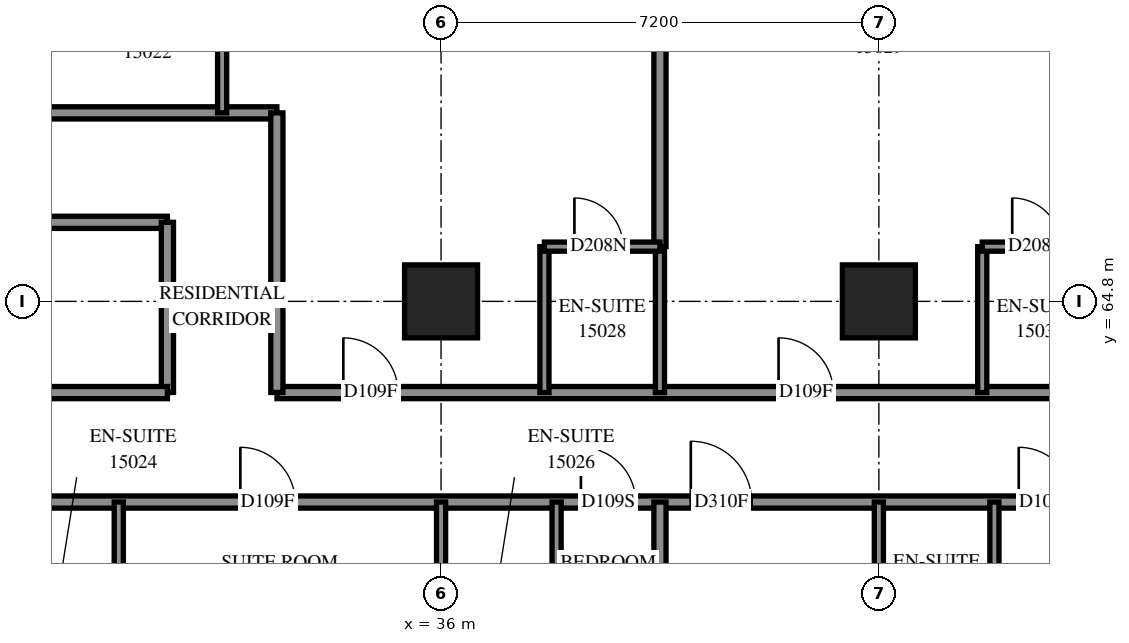
"""IFC4 building model, lengths in metres.
Left out: names, types, materials, properties, quantities, classifications, styles, units other than length and angle.
Written with IfcOpenShell. Run it as: python <this file> out.ifc"""

import sys

from ifc_helpers import new_model, si_unit, direction, frame, frame_2d, origin, origin_2d, place, context, subcontext, project, spatial, rectangle, extrude, element, fill, save


model = new_model("IFC4")
c1 = context("Model", 3, precision=1e-05, world=origin(), true_north=direction((0.0, 1.0)))
c2 = subcontext(c1, "Body", "Model", "MODEL_VIEW")
j1 = project(units=[si_unit("LENGTHUNIT", "METRE"), si_unit("PLANEANGLEUNIT", "RADIAN")], contexts=[c1])
p1 = place(None, origin())
s1 = spatial("IfcSite", under=j1, at=p1, CompositionType="ELEMENT")
p2 = place(p1, origin())
s2 = spatial("IfcBuilding", under=s1, at=p2, CompositionType="ELEMENT")
p3 = place(p2, frame((0.0, 0.0, 57.6)))
s3 = spatial("IfcBuildingStorey", under=s2, at=p3, CompositionType="ELEMENT", Elevation=57.6)
for number, where, z_axis, x_axis in (
    (1, (36.0, 64.8, 0.0), (0.0, 0.0, 1.0), (1.0, 0.0, 0.0)),
    (2, (43.2, 64.8, 0.0), (0.0, 0.0, 1.0), (1.0, 0.0, 0.0)),
):
    element("IfcColumn", number, at=place(p3, frame(where, z_axis=z_axis, x_axis=x_axis)), inside=s3, PredefinedType="COLUMN", context=c2, shape_type="SweptSolid", body=[
        extrude(rectangle(XDim=1.2, YDim=1.2, at=origin_2d()), origin(), (0.0, 0.0, 1.0), 3.1),
    ])
p4 = place(p3, frame((28.8, 61.5, 0.0), z_axis=(0.0, 0.0, 1.0), x_axis=(1.0, 0.0, 0.0)))
e3 = element("IfcWall", 3, at=p4, inside=s3, PredefinedType="PARTITIONING", context=c2, shape_type="SweptSolid", body=[
    extrude(rectangle(XDim=24.3, YDim=0.2, at=frame_2d((12.15, 0.0))), origin(), (0.0, 0.0, 1.0), 3.1),
])
p5 = place(p4, frame((3.899, 0.0, 0.0)))
e4 = element("IfcOpeningElement", 4, at=p5, cuts=e3, PredefinedType="OPENING", context=c2, shape_type="SweptSolid", body=[
    extrude(rectangle(XDim=0.9, YDim=2.1, at=frame_2d((0.45, 1.05))), frame((0.0, 0.11, 0.0), z_axis=(0.0, -1.0, 0.0), x_axis=(1.0, 0.0, 0.0)), (0.0, 0.0, 1.0), 0.22),
])
p6 = place(p4, frame((9.5, 0.0, 0.0)))
e5 = element("IfcOpeningElement", 5, at=p6, cuts=e3, PredefinedType="OPENING", context=c2, shape_type="SweptSolid", body=[
    extrude(rectangle(XDim=0.9, YDim=2.1, at=frame_2d((0.45, 1.05))), frame((0.0, 0.11, 0.0), z_axis=(0.0, -1.0, 0.0), x_axis=(1.0, 0.0, 0.0)), (0.0, 0.0, 1.0), 0.22),
])
p7 = place(p4, frame((11.307, 0.0, 0.0)))
e6 = element("IfcOpeningElement", 6, at=p7, cuts=e3, PredefinedType="OPENING", context=c2, shape_type="SweptSolid", body=[
    extrude(rectangle(XDim=1.0, YDim=2.1, at=frame_2d((0.5, 1.05))), frame((0.0, 0.11, 0.0), z_axis=(0.0, -1.0, 0.0), x_axis=(1.0, 0.0, 0.0)), (0.0, 0.0, 1.0), 0.22),
])
p8 = place(p4, frame((16.7, 0.0, 0.0)))
e7 = element("IfcOpeningElement", 7, at=p8, cuts=e3, PredefinedType="OPENING", context=c2, shape_type="SweptSolid", body=[
    extrude(rectangle(XDim=0.9, YDim=2.1, at=frame_2d((0.45, 1.05))), frame((0.0, 0.11, 0.0), z_axis=(0.0, -1.0, 0.0), x_axis=(1.0, 0.0, 0.0)), (0.0, 0.0, 1.0), 0.22),
])
p9 = place(p4, frame((18.508, 0.0, 0.0)))
e8 = element("IfcOpeningElement", 8, at=p9, cuts=e3, PredefinedType="OPENING", context=c2, shape_type="SweptSolid", body=[
    extrude(rectangle(XDim=1.0, YDim=2.1, at=frame_2d((0.5, 1.05))), frame((0.0, 0.11, 0.0), z_axis=(0.0, -1.0, 0.0), x_axis=(1.0, 0.0, 0.0)), (0.0, 0.0, 1.0), 0.22),
])
p10 = place(p4, frame((23.033, 0.0, 0.0)))
e9 = element("IfcOpeningElement", 9, at=p10, cuts=e3, PredefinedType="OPENING", context=c2, shape_type="SweptSolid", body=[
    extrude(rectangle(XDim=1.0, YDim=2.1, at=frame_2d((0.5, 1.05))), frame((0.0, 0.11, 0.0), z_axis=(0.0, -1.0, 0.0), x_axis=(1.0, 0.0, 0.0)), (0.0, 0.0, 1.0), 0.22),
])
p11 = place(p3, frame((33.302, 63.3, 0.0), z_axis=(0.0, 0.0, 1.0), x_axis=(1.0, 0.0, 0.0)))
e10 = element("IfcWall", 10, at=p11, inside=s3, PredefinedType="PARTITIONING", context=c2, shape_type="SweptSolid", body=[
    extrude(rectangle(XDim=21.798, YDim=0.2, at=frame_2d((10.899, 0.0))), origin(), (0.0, 0.0, 1.0), 3.1),
])
p12 = place(p11, frame((1.091, 0.0, 0.0)))
e11 = element("IfcOpeningElement", 11, at=p12, cuts=e10, PredefinedType="OPENING", context=c2, shape_type="SweptSolid", body=[
    extrude(rectangle(XDim=0.9, YDim=2.1, at=frame_2d((0.45, 1.05))), frame((0.0, 0.11, 0.0), z_axis=(0.0, -1.0, 0.0), x_axis=(1.0, 0.0, 0.0)), (0.0, 0.0, 1.0), 0.22),
])
p13 = place(p11, frame((8.248, 0.0, 0.0)))
e12 = element("IfcOpeningElement", 12, at=p13, cuts=e10, PredefinedType="OPENING", context=c2, shape_type="SweptSolid", body=[
    extrude(rectangle(XDim=0.9, YDim=2.1, at=frame_2d((0.45, 1.05))), frame((0.0, 0.11, 0.0), z_axis=(0.0, -1.0, 0.0), x_axis=(1.0, 0.0, 0.0)), (0.0, 0.0, 1.0), 0.22),
])
p14 = place(p11, frame((15.448, 0.0, 0.0)))
e13 = element("IfcOpeningElement", 13, at=p14, cuts=e10, PredefinedType="OPENING", context=c2, shape_type="SweptSolid", body=[
    extrude(rectangle(XDim=0.9, YDim=2.1, at=frame_2d((0.45, 1.05))), frame((0.0, 0.11, 0.0), z_axis=(0.0, -1.0, 0.0), x_axis=(1.0, 0.0, 0.0)), (0.0, 0.0, 1.0), 0.22),
])
p15 = place(p3, frame((21.602, 67.9, 0.0), z_axis=(0.0, 0.0, 1.0), x_axis=(1.0, 0.0, 0.0)))
e14 = element("IfcWall", 14, at=p15, inside=s3, PredefinedType="PARTITIONING", context=c2, shape_type="SweptSolid", body=[
    extrude(rectangle(XDim=11.698, YDim=0.2, at=frame_2d((5.849, 0.0))), origin(), (0.0, 0.0, 1.0), 3.1),
])
p16 = place(p15, frame((5.955, 0.0, 0.0)))
e15 = element("IfcOpeningElement", 15, at=p16, cuts=e14, PredefinedType="OPENING", context=c2, shape_type="SweptSolid", body=[
    extrude(rectangle(XDim=0.9, YDim=2.1, at=frame_2d((0.45, 1.05))), frame((0.0, 0.11, 0.0), z_axis=(0.0, -1.0, 0.0), x_axis=(1.0, 0.0, 0.0)), (0.0, 0.0, 1.0), 0.22),
])
p17 = place(p3, frame((21.6, 66.1, 0.0), z_axis=(0.0, 0.0, 1.0), x_axis=(1.0, 0.0, 0.0)))
e16 = element("IfcWall", 16, at=p17, inside=s3, PredefinedType="PARTITIONING", context=c2, shape_type="SweptSolid", body=[
    extrude(rectangle(XDim=9.9, YDim=0.2, at=frame_2d((4.95, 0.0))), origin(), (0.0, 0.0, 1.0), 3.1),
])
p18 = place(p17, frame((5.314, 0.0, 0.0)))
e17 = element("IfcOpeningElement", 17, at=p18, cuts=e16, PredefinedType="OPENING", context=c2, shape_type="SweptSolid", body=[
    extrude(rectangle(XDim=1.0, YDim=2.1, at=frame_2d((0.5, 1.05))), frame((0.0, 0.11, 0.0), z_axis=(0.0, -1.0, 0.0), x_axis=(1.0, 0.0, 0.0)), (0.0, 0.0, 1.0), 0.22),
])
p19 = place(p3, frame((39.6, 65.7, 0.0), z_axis=(0.0, 0.0, 1.0), x_axis=(0.0, 1.0, 0.0)))
e18 = element("IfcWall", 18, at=p19, inside=s3, PredefinedType="PARTITIONING", context=c2, shape_type="SweptSolid", body=[
    extrude(rectangle(XDim=7.143, YDim=0.2, at=frame_2d((3.571, 0.0))), origin(), (0.0, 0.0, 1.0), 3.1),
])
p20 = place(p3, frame((39.6, 55.778, 0.0), z_axis=(0.0, 0.0, 1.0), x_axis=(0.0, 1.0, 0.0)))
e19 = element("IfcWall", 19, at=p20, inside=s3, PredefinedType="PARTITIONING", context=c2, shape_type="SweptSolid", body=[
    extrude(rectangle(XDim=5.722, YDim=0.2, at=frame_2d((2.861, 0.0))), origin(), (0.0, 0.0, 1.0), 3.1),
])
p21 = place(p3, frame((33.3, 63.302, 0.0), z_axis=(0.0, 0.0, 1.0), x_axis=(0.0, 1.0, 0.0)))
e20 = element("IfcWall", 20, at=p21, inside=s3, PredefinedType="PARTITIONING", context=c2, shape_type="SweptSolid", body=[
    extrude(rectangle(XDim=4.598, YDim=0.2, at=frame_2d((2.299, 0.0))), origin(), (0.0, 0.0, 1.0), 3.1),
])
p22 = place(p3, frame((31.5, 63.302, 0.0), z_axis=(0.0, 0.0, 1.0), x_axis=(0.0, 1.0, 0.0)))
e21 = element("IfcWall", 21, at=p22, inside=s3, PredefinedType="PARTITIONING", context=c2, shape_type="SweptSolid", body=[
    extrude(rectangle(XDim=2.798, YDim=0.2, at=frame_2d((1.399, 0.0))), origin(), (0.0, 0.0, 1.0), 3.1),
])
p23 = place(p3, frame((28.802, 63.3, 0.0), z_axis=(0.0, 0.0, 1.0), x_axis=(1.0, 0.0, 0.0)))
e22 = element("IfcWall", 22, at=p23, inside=s3, PredefinedType="PARTITIONING", context=c2, shape_type="SweptSolid", body=[
    extrude(rectangle(XDim=2.698, YDim=0.2, at=frame_2d((1.349, 0.0))), origin(), (0.0, 0.0, 1.0), 3.1),
])
for number, where, z_axis, x_axis in (
    (23, (37.7, 63.3, 0.0), (0.0, 0.0, 1.0), (0.0, 1.0, 0.0)),
    (24, (39.6, 63.3, 0.0), (0.0, 0.0, 1.0), (0.0, 1.0, 0.0)),
    (25, (44.9, 63.3, 0.0), (0.0, 0.0, 1.0), (0.0, 1.0, 0.0)),
    (26, (30.7, 59.1, 0.0), (0.0, 0.0, 1.0), (0.0, 1.0, 0.0)),
    (27, (37.9, 59.1, 0.0), (0.0, 0.0, 1.0), (0.0, 1.0, 0.0)),
    (28, (36.0, 59.1, 0.0), (0.0, 0.0, 1.0), (0.0, 1.0, 0.0)),
    (29, (45.1, 59.1, 0.0), (0.0, 0.0, 1.0), (0.0, 1.0, 0.0)),
    (30, (43.2, 59.1, 0.0), (0.0, 0.0, 1.0), (0.0, 1.0, 0.0)),
    (31, (32.4, 67.9, 0.0), (0.0, 0.0, 1.0), (0.0, 1.0, 0.0)),
):
    element("IfcWall", number, at=place(p3, frame(where, z_axis=z_axis, x_axis=x_axis)), inside=s3, PredefinedType="PARTITIONING", context=c2, shape_type="SweptSolid", body=[
        extrude(rectangle(XDim=2.4, YDim=0.15, at=frame_2d((1.2, 0.0))), origin(), (0.0, 0.0, 1.0), 3.1),
    ])
p24 = place(p3, frame((37.7, 65.7, 0.0), z_axis=(0.0, 0.0, 1.0), x_axis=(1.0, 0.0, 0.0)))
e32 = element("IfcWall", 32, at=p24, inside=s3, PredefinedType="PARTITIONING", context=c2, shape_type="SweptSolid", body=[
    extrude(rectangle(XDim=1.9, YDim=0.15, at=frame_2d((0.95, 0.0))), origin(), (0.0, 0.0, 1.0), 3.1),
])
p25 = place(p24, frame((0.493, 0.0, 0.0)))
e33 = element("IfcOpeningElement", 33, at=p25, cuts=e32, PredefinedType="OPENING", context=c2, shape_type="SweptSolid", body=[
    extrude(rectangle(XDim=0.8, YDim=2.1, at=frame_2d((0.4, 1.05))), frame((0.0, 0.085, 0.0), z_axis=(0.0, -1.0, 0.0), x_axis=(1.0, 0.0, 0.0)), (0.0, 0.0, 1.0), 0.17),
])
p26 = place(p3, frame((44.9, 65.7, 0.0), z_axis=(0.0, 0.0, 1.0), x_axis=(1.0, 0.0, 0.0)))
e34 = element("IfcWall", 34, at=p26, inside=s3, PredefinedType="PARTITIONING", context=c2, shape_type="SweptSolid", body=[
    extrude(rectangle(XDim=1.9, YDim=0.15, at=frame_2d((0.95, 0.0))), origin(), (0.0, 0.0, 1.0), 3.1),
])
p27 = place(p26, frame((0.493, 0.0, 0.0)))
e35 = element("IfcOpeningElement", 35, at=p27, cuts=e34, PredefinedType="OPENING", context=c2, shape_type="SweptSolid", body=[
    extrude(rectangle(XDim=0.8, YDim=2.1, at=frame_2d((0.4, 1.05))), frame((0.0, 0.085, 0.0), z_axis=(0.0, -1.0, 0.0), x_axis=(1.0, 0.0, 0.0)), (0.0, 0.0, 1.0), 0.17),
])
p28 = place(p5, origin())
e36 = element("IfcDoor", 36, at=p28, inside=s3, OperationType="SINGLE_SWING_LEFT", PredefinedType="DOOR", context=c2, shape_type="SweptSolid", body=[
    extrude(rectangle(XDim=0.9, YDim=2.1, at=frame_2d((0.45, 1.05))), frame((0.0, 0.025, 0.0), z_axis=(0.0, -1.0, 0.0), x_axis=(1.0, 0.0, 0.0)), (0.0, 0.0, 1.0), 0.05),
])
fill(e4, e36)
p29 = place(p6, origin())
e37 = element("IfcDoor", 37, at=p29, inside=s3, OperationType="SINGLE_SWING_LEFT", PredefinedType="DOOR", context=c2, shape_type="SweptSolid", body=[
    extrude(rectangle(XDim=0.9, YDim=2.1, at=frame_2d((0.45, 1.05))), frame((0.0, 0.025, 0.0), z_axis=(0.0, -1.0, 0.0), x_axis=(1.0, 0.0, 0.0)), (0.0, 0.0, 1.0), 0.05),
])
fill(e5, e37)
p30 = place(p12, origin())
e38 = element("IfcDoor", 38, at=p30, inside=s3, OperationType="SINGLE_SWING_LEFT", PredefinedType="DOOR", context=c2, shape_type="SweptSolid", body=[
    extrude(rectangle(XDim=0.9, YDim=2.1, at=frame_2d((0.45, 1.05))), frame((0.0, 0.025, 0.0), z_axis=(0.0, -1.0, 0.0), x_axis=(1.0, 0.0, 0.0)), (0.0, 0.0, 1.0), 0.05),
])
fill(e11, e38)
p31 = place(p25, origin())
e39 = element("IfcDoor", 39, at=p31, inside=s3, OperationType="SINGLE_SWING_RIGHT", PredefinedType="DOOR", context=c2, shape_type="SweptSolid", body=[
    extrude(rectangle(XDim=0.8, YDim=2.1, at=frame_2d((0.4, 1.05))), frame((0.0, 0.025, 0.0), z_axis=(0.0, -1.0, 0.0), x_axis=(1.0, 0.0, 0.0)), (0.0, 0.0, 1.0), 0.05),
])
fill(e33, e39)
p32 = place(p13, origin())
e40 = element("IfcDoor", 40, at=p32, inside=s3, OperationType="SINGLE_SWING_LEFT", PredefinedType="DOOR", context=c2, shape_type="SweptSolid", body=[
    extrude(rectangle(XDim=0.9, YDim=2.1, at=frame_2d((0.45, 1.05))), frame((0.0, 0.025, 0.0), z_axis=(0.0, -1.0, 0.0), x_axis=(1.0, 0.0, 0.0)), (0.0, 0.0, 1.0), 0.05),
])
fill(e12, e40)
p33 = place(p27, origin())
e41 = element("IfcDoor", 41, at=p33, inside=s3, OperationType="SINGLE_SWING_RIGHT", PredefinedType="DOOR", context=c2, shape_type="SweptSolid", body=[
    extrude(rectangle(XDim=0.8, YDim=2.1, at=frame_2d((0.4, 1.05))), frame((0.0, 0.025, 0.0), z_axis=(0.0, -1.0, 0.0), x_axis=(1.0, 0.0, 0.0)), (0.0, 0.0, 1.0), 0.05),
])
fill(e35, e41)
p34 = place(p7, origin())
e42 = element("IfcDoor", 42, at=p34, inside=s3, OperationType="SINGLE_SWING_RIGHT", PredefinedType="DOOR", context=c2, shape_type="SweptSolid", body=[
    extrude(rectangle(XDim=1.0, YDim=2.1, at=frame_2d((0.5, 1.05))), frame((0.0, 0.025, 0.0), z_axis=(0.0, -1.0, 0.0), x_axis=(1.0, 0.0, 0.0)), (0.0, 0.0, 1.0), 0.05),
])
fill(e6, e42)
p35 = place(p8, origin())
e43 = element("IfcDoor", 43, at=p35, inside=s3, OperationType="SINGLE_SWING_LEFT", PredefinedType="DOOR", context=c2, shape_type="SweptSolid", body=[
    extrude(rectangle(XDim=0.9, YDim=2.1, at=frame_2d((0.45, 1.05))), frame((0.0, 0.025, 0.0), z_axis=(0.0, -1.0, 0.0), x_axis=(1.0, 0.0, 0.0)), (0.0, 0.0, 1.0), 0.05),
])
fill(e7, e43)
save(model, sys.argv[1])
